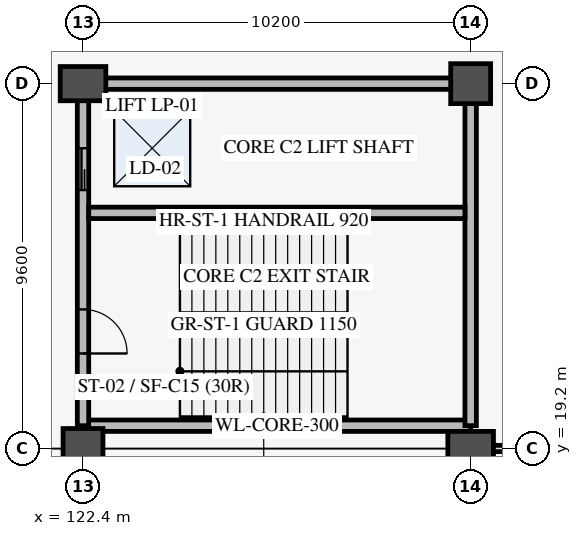
"""IFC4 building model, lengths in metres.
Left out: names, types, materials, properties, quantities, classifications, styles, units other than length and angle.
Written with IfcOpenShell. Run it as: python <this file> out.ifc"""

import sys

from ifc_helpers import new_model, si_unit, direction, frame, frame_2d, origin, origin_2d, place, context, subcontext, project, spatial, rectangle, extrude, element, fill, save


model = new_model("IFC4")
c1 = context("Model", 3, precision=1e-05, world=origin(), true_north=direction((0.0, 1.0)))
c2 = subcontext(c1, "Body", "Model", "MODEL_VIEW")
j1 = project(units=[si_unit("LENGTHUNIT", "METRE"), si_unit("PLANEANGLEUNIT", "RADIAN")], contexts=[c1])
p1 = place(None, origin())
s1 = spatial("IfcSite", under=j1, at=p1, CompositionType="ELEMENT")
p2 = place(p1, origin())
s2 = spatial("IfcBuilding", under=s1, at=p2, CompositionType="ELEMENT")
p3 = place(p2, frame((0.0, 0.0, -4.5)))
s3 = spatial("IfcBuildingStorey", under=s2, at=p3, CompositionType="ELEMENT", Elevation=-4.5)
p4 = place(p3, frame((122.4, 19.2, 0.0), z_axis=(0.0, 0.0, 1.0), x_axis=(1.0, 0.0, 0.0)))
e1 = element("IfcColumn", 1, at=p4, inside=s3, PredefinedType="COLUMN", context=c2, shape_type="SweptSolid", body=[
    extrude(rectangle(XDim=1.05, YDim=1.05, at=origin_2d()), origin(), (0.0, 0.0, 1.0), 4.5),
])
for number, where, z_axis, x_axis in (
    (2, (122.4, 28.8, 0.0), (0.0, 0.0, 1.0), (1.0, 0.0, 0.0)),
    (3, (132.6, 19.2, 0.0), (0.0, 0.0, 1.0), (1.0, 0.0, 0.0)),
):
    element("IfcColumn", number, at=place(p3, frame(where, z_axis=z_axis, x_axis=x_axis)), inside=s3, PredefinedType="COLUMN", context=c2, shape_type="SweptSolid", body=[
        extrude(rectangle(XDim=1.2, YDim=0.9, at=origin_2d()), origin(), (0.0, 0.0, 1.0), 4.5),
    ])
p5 = place(p3, frame((132.6, 28.8, 0.0), z_axis=(0.0, 0.0, 1.0), x_axis=(1.0, 0.0, 0.0)))
e4 = element("IfcColumn", 4, at=p5, inside=s3, PredefinedType="COLUMN", context=c2, shape_type="SweptSolid", body=[
    extrude(rectangle(XDim=1.05, YDim=1.05, at=origin_2d()), origin(), (0.0, 0.0, 1.0), 4.5),
])
for number, where, z_axis, x_axis in (
    (5, (122.4, 19.8, 0.0), (0.0, 0.0, 1.0), (1.0, 0.0, 0.0)),
    (6, (122.4, 28.8, 0.0), (0.0, 0.0, 1.0), (1.0, 0.0, 0.0)),
):
    element("IfcWall", number, at=place(p3, frame(where, z_axis=z_axis, x_axis=x_axis)), inside=s3, PredefinedType="SHEAR", context=c2, shape_type="SweptSolid", body=[
        extrude(rectangle(XDim=10.2, YDim=0.3, at=frame_2d((5.1, 0.0))), origin(), (0.0, 0.0, 1.0), 4.5),
    ])
p6 = place(p3, frame((122.4, 19.8, 0.0), z_axis=(0.0, 0.0, 1.0), x_axis=(0.0, 1.0, 0.0)))
e7 = element("IfcWall", 7, at=p6, inside=s3, PredefinedType="SHEAR", context=c2, shape_type="SweptSolid", body=[
    extrude(rectangle(XDim=9.0, YDim=0.3, at=frame_2d((4.5, 0.0))), origin(), (0.0, 0.0, 1.0), 4.5),
])
p7 = place(p6, frame((1.9, 0.0, 0.0)))
e8 = element("IfcOpeningElement", 8, at=p7, cuts=e7, PredefinedType="OPENING", context=c2, shape_type="SweptSolid", body=[
    extrude(rectangle(XDim=1.16, YDim=2.2, at=frame_2d((0.58, 1.1))), frame((0.0, 0.16, 0.0), z_axis=(0.0, -1.0, 0.0), x_axis=(1.0, 0.0, 0.0)), (0.0, 0.0, 1.0), 0.32),
])
p8 = place(p6, frame((6.2, 0.0, 0.0)))
e9 = element("IfcOpeningElement", 9, at=p8, cuts=e7, PredefinedType="OPENING", context=c2, shape_type="SweptSolid", body=[
    extrude(rectangle(XDim=1.1, YDim=2.2, at=frame_2d((0.55, 1.1))), frame((0.0, 0.16, 0.0), z_axis=(0.0, -1.0, 0.0), x_axis=(1.0, 0.0, 0.0)), (0.0, 0.0, 1.0), 0.32),
])
p9 = place(p3, frame((132.6, 19.8, 0.0), z_axis=(0.0, 0.0, 1.0), x_axis=(0.0, 1.0, 0.0)))
e10 = element("IfcWall", 10, at=p9, inside=s3, PredefinedType="SHEAR", context=c2, shape_type="SweptSolid", body=[
    extrude(rectangle(XDim=9.0, YDim=0.3, at=frame_2d((4.5, 0.0))), origin(), (0.0, 0.0, 1.0), 4.5),
])
p10 = place(p3, frame((122.55, 25.4, 0.0), z_axis=(0.0, 0.0, 1.0), x_axis=(1.0, 0.0, 0.0)))
e11 = element("IfcWall", 11, at=p10, inside=s3, PredefinedType="SHEAR", context=c2, shape_type="SweptSolid", body=[
    extrude(rectangle(XDim=9.9, YDim=0.3, at=frame_2d((4.95, 0.0))), origin(), (0.0, 0.0, 1.0), 4.5),
])
p11 = place(p3, frame((133.0, 19.2, 0.0), z_axis=(0.0, 0.0, 1.0), x_axis=(1.0, 0.0, 0.0)))
e12 = element("IfcWall", 12, at=p11, inside=s3, PredefinedType="PARTITIONING", context=c2, shape_type="SweptSolid", body=[
    extrude(rectangle(XDim=9.4, YDim=0.165, at=frame_2d((4.7, 0.0))), origin(), (0.0, 0.0, 1.0), 2.75),
])
p12 = place(p11, frame((4.09, 0.0, 0.0)))
e13 = element("IfcOpeningElement", 13, at=p12, cuts=e12, PredefinedType="OPENING", context=c2, shape_type="SweptSolid", body=[
    extrude(rectangle(XDim=1.22, YDim=2.22, at=frame_2d((0.61, 1.11))), frame((0.0, 0.093, 0.0), z_axis=(0.0, -1.0, 0.0), x_axis=(1.0, 0.0, 0.0)), (0.0, 0.0, 1.0), 0.185),
])
p13 = place(p7, origin())
e14 = element("IfcDoor", 14, at=p13, inside=s3, OperationType="SINGLE_SWING_LEFT", PredefinedType="DOOR", context=c2, shape_type="SweptSolid", body=[
    extrude(rectangle(XDim=1.16, YDim=2.2, at=frame_2d((0.58, 1.1))), frame((0.0, 0.025, 0.0), z_axis=(0.0, -1.0, 0.0), x_axis=(1.0, 0.0, 0.0)), (0.0, 0.0, 1.0), 0.05),
])
fill(e8, e14)
p14 = place(p8, origin())
e15 = element("IfcDoor", 15, at=p14, inside=s3, OperationType="SLIDING_TO_RIGHT", PredefinedType="DOOR", context=c2, shape_type="SweptSolid", body=[
    extrude(rectangle(XDim=1.1, YDim=2.2, at=frame_2d((0.55, 1.1))), frame((0.0, 0.025, 0.0), z_axis=(0.0, -1.0, 0.0), x_axis=(1.0, 0.0, 0.0)), (0.0, 0.0, 1.0), 0.05),
])
fill(e9, e15)
save(model, sys.argv[1])
